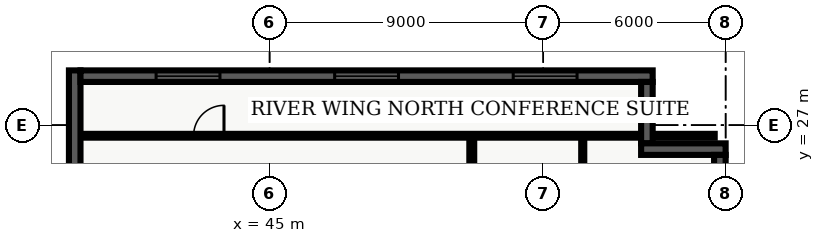
"""IFC4 building model, lengths in metres.
Left out: names, types, materials, properties, quantities, classifications, styles, units other than length and angle.
Written with IfcOpenShell. Run it as: python <this file> out.ifc"""

import sys

from ifc_helpers import new_model, entity, si_unit, converted_unit, direction, frame, origin_with_axes, origin_2d_with_axis, place, context, subcontext, project, spatial, polyline, rectangle, outline, extrude, element, fill, save


model = new_model("IFC4")
c1 = context("Model", 3, precision=1e-05, world=origin_with_axes(), true_north=direction((0.0, 1.0)))
c2 = subcontext(c1, "Body", "Model", "MODEL_VIEW")
j1 = project(units=[si_unit("LENGTHUNIT", "METRE"), converted_unit("PLANEANGLEUNIT", "DEGREE", entity("IfcPlaneAngleMeasure", 0.017), si_unit("PLANEANGLEUNIT", "RADIAN"), dimensions=[0, 0, 0, 0, 0, 0, 0])], contexts=[c1])
p1 = place(None, origin_with_axes())
s1 = spatial("IfcSite", under=j1, at=p1, CompositionType="ELEMENT")
p2 = place(p1, origin_with_axes())
s2 = spatial("IfcBuilding", under=s1, at=p2, CompositionType="ELEMENT")
p3 = place(p2, frame((0.0, 0.0, 75.6), z_axis=(0.0, 0.0, 1.0), x_axis=(1.0, 0.0, 0.0)))
s3 = spatial("IfcBuildingStorey", under=s2, at=p3, CompositionType="ELEMENT", Elevation=75.6)
p4 = place(p3, frame((51.65, 7.85, 0.0), z_axis=(0.0, 0.0, 1.0), x_axis=(0.0, 1.0, 0.0)))
e1 = element("IfcWall", 1, at=p4, inside=s3, PredefinedType="PARTITIONING", context=c2, shape_type="SweptSolid", body=[
    extrude(outline(polyline([(0.0, -0.08), (18.8, -0.08), (18.8, 0.08), (0.0, 0.08), (0.0, -0.08)])), origin_with_axes(), (0.0, 0.0, 1.0), 2.64),
])
p5 = place(p4, frame((4.443, 0.0, 0.0), z_axis=(0.0, 0.0, 1.0), x_axis=(1.0, 0.0, 0.0)))
e2 = element("IfcOpeningElement", 2, at=p5, cuts=e1, PredefinedType="OPENING", context=c2, shape_type="SweptSolid", body=[
    extrude(rectangle(XDim=1.0, YDim=0.18, at=origin_2d_with_axis()), origin_with_axes(), (0.0, 0.0, 1.0), 2.15),
])
p6 = place(p4, frame((13.503, 0.0, 0.0), z_axis=(0.0, 0.0, 1.0), x_axis=(1.0, 0.0, 0.0)))
e3 = element("IfcOpeningElement", 3, at=p6, cuts=e1, PredefinedType="OPENING", context=c2, shape_type="SweptSolid", body=[
    extrude(rectangle(XDim=1.0, YDim=0.18, at=origin_2d_with_axis()), origin_with_axes(), (0.0, 0.0, 1.0), 2.15),
])
p7 = place(p3, frame((38.76, 26.65, 0.0), z_axis=(0.0, 0.0, 1.0), x_axis=(1.0, 0.0, 0.0)))
e4 = element("IfcWall", 4, at=p7, inside=s3, PredefinedType="PARTITIONING", context=c2, shape_type="SweptSolid", body=[
    extrude(outline(polyline([(0.0, -0.062), (20.88, -0.062), (20.88, 0.062), (0.0, 0.062), (0.0, -0.062)])), origin_with_axes(), (0.0, 0.0, 1.0), 2.64),
])
p8 = place(p7, frame((4.24, 0.0, 0.0), z_axis=(0.0, 0.0, 1.0), x_axis=(1.0, 0.0, 0.0)))
e5 = element("IfcOpeningElement", 5, at=p8, cuts=e4, PredefinedType="OPENING", context=c2, shape_type="SweptSolid", body=[
    extrude(rectangle(XDim=1.0, YDim=0.145, at=origin_2d_with_axis()), origin_with_axes(), (0.0, 0.0, 1.0), 2.15),
])
p9 = place(p3, frame((55.3, 7.98, 0.0), z_axis=(0.0, 0.0, 1.0), x_axis=(0.0, 1.0, 0.0)))
e6 = element("IfcWall", 6, at=p9, inside=s3, PredefinedType="PARTITIONING", context=c2, shape_type="SweptSolid", body=[
    extrude(outline(polyline([(0.0, -0.05), (18.54, -0.05), (18.54, 0.05), (0.0, 0.05), (0.0, -0.05)])), origin_with_axes(), (0.0, 0.0, 1.0), 2.64),
])
p10 = place(p9, frame((4.033, 0.0, 0.0), z_axis=(0.0, 0.0, 1.0), x_axis=(1.0, 0.0, 0.0)))
e7 = element("IfcOpeningElement", 7, at=p10, cuts=e6, PredefinedType="OPENING", context=c2, shape_type="SweptSolid", body=[
    extrude(rectangle(XDim=0.95, YDim=0.12, at=origin_2d_with_axis()), origin_with_axes(), (0.0, 0.0, 1.0), 2.15),
])
p11 = place(p9, frame((13.373, 0.0, 0.0), z_axis=(0.0, 0.0, 1.0), x_axis=(1.0, 0.0, 0.0)))
e8 = element("IfcOpeningElement", 8, at=p11, cuts=e6, PredefinedType="OPENING", context=c2, shape_type="SweptSolid", body=[
    extrude(rectangle(XDim=0.95, YDim=0.12, at=origin_2d_with_axis()), origin_with_axes(), (0.0, 0.0, 1.0), 2.15),
])
p12 = place(p3, frame((38.59, 21.22, 0.0), z_axis=(0.0, 0.0, 1.0), x_axis=(0.0, 1.0, 0.0)))
e9 = element("IfcWall", 9, at=p12, inside=s3, PredefinedType="SOLIDWALL", context=c2, shape_type="SweptSolid", body=[
    extrude(outline(polyline([(0.0, -0.19), (7.58, -0.19), (7.58, 0.19), (0.0, 0.19), (0.0, -0.19)])), origin_with_axes(), (0.0, 0.0, 1.0), 3.6),
])
p13 = place(p3, frame((38.78, 28.61, 0.0), z_axis=(0.0, 0.0, 1.0), x_axis=(1.0, 0.0, 0.0)))
e10 = element("IfcWall", 10, at=p13, inside=s3, PredefinedType="SOLIDWALL", context=c2, shape_type="SweptSolid", body=[
    extrude(outline(polyline([(0.0, -0.19), (18.82, -0.19), (18.82, 0.19), (0.0, 0.19), (0.0, -0.19)])), origin_with_axes(), (0.0, 0.0, 1.0), 3.6),
])
p14 = place(p13, frame((3.537, 0.0, 0.45), z_axis=(0.0, 0.0, 1.0), x_axis=(1.0, 0.0, 0.0)))
e11 = element("IfcOpeningElement", 11, at=p14, cuts=e10, PredefinedType="OPENING", context=c2, shape_type="SweptSolid", body=[
    extrude(rectangle(XDim=2.1, YDim=0.4, at=origin_2d_with_axis()), origin_with_axes(), (0.0, 0.0, 1.0), 2.2),
])
p15 = place(p13, frame((9.41, 0.0, 0.45), z_axis=(0.0, 0.0, 1.0), x_axis=(1.0, 0.0, 0.0)))
e12 = element("IfcOpeningElement", 12, at=p15, cuts=e10, PredefinedType="OPENING", context=c2, shape_type="SweptSolid", body=[
    extrude(rectangle(XDim=2.1, YDim=0.4, at=origin_2d_with_axis()), origin_with_axes(), (0.0, 0.0, 1.0), 2.2),
])
p16 = place(p13, frame((15.283, 0.0, 0.45), z_axis=(0.0, 0.0, 1.0), x_axis=(1.0, 0.0, 0.0)))
e13 = element("IfcOpeningElement", 13, at=p16, cuts=e10, PredefinedType="OPENING", context=c2, shape_type="SweptSolid", body=[
    extrude(rectangle(XDim=2.1, YDim=0.4, at=origin_2d_with_axis()), origin_with_axes(), (0.0, 0.0, 1.0), 2.2),
])
p17 = place(p3, frame((57.41, 28.42, 0.0), z_axis=(0.0, 0.0, 1.0), x_axis=(0.0, -1.0, 0.0)))
e14 = element("IfcWall", 14, at=p17, inside=s3, PredefinedType="SOLIDWALL", context=c2, shape_type="SweptSolid", body=[
    extrude(outline(polyline([(0.0, -0.19), (2.02, -0.19), (2.02, 0.19), (0.0, 0.19), (0.0, -0.19)])), origin_with_axes(), (0.0, 0.0, 1.0), 3.6),
])
p18 = place(p3, frame((57.22, 26.21, 0.0), z_axis=(0.0, 0.0, 1.0), x_axis=(1.0, 0.0, 0.0)))
e15 = element("IfcWall", 15, at=p18, inside=s3, PredefinedType="SOLIDWALL", context=c2, shape_type="SweptSolid", body=[
    extrude(outline(polyline([(0.0, -0.19), (2.78, -0.19), (2.78, 0.19), (0.0, 0.19), (0.0, -0.19)])), origin_with_axes(), (0.0, 0.0, 1.0), 3.6),
])
p19 = place(p3, frame((59.81, 26.02, 0.0), z_axis=(0.0, 0.0, 1.0), x_axis=(0.0, -1.0, 0.0)))
e16 = element("IfcWall", 16, at=p19, inside=s3, PredefinedType="SOLIDWALL", context=c2, shape_type="SweptSolid", body=[
    extrude(outline(polyline([(0.0, -0.19), (23.62, -0.19), (23.62, 0.19), (0.0, 0.19), (0.0, -0.19)])), origin_with_axes(), (0.0, 0.0, 1.0), 3.6),
])
p20 = place(p19, frame((3.853, 0.0, 0.45), z_axis=(0.0, 0.0, 1.0), x_axis=(1.0, 0.0, 0.0)))
e17 = element("IfcOpeningElement", 17, at=p20, cuts=e16, PredefinedType="OPENING", context=c2, shape_type="SweptSolid", body=[
    extrude(rectangle(XDim=2.1, YDim=0.4, at=origin_2d_with_axis()), origin_with_axes(), (0.0, 0.0, 1.0), 2.2),
])
p21 = place(p19, frame((20.218, 0.0, 0.45), z_axis=(0.0, 0.0, 1.0), x_axis=(1.0, 0.0, 0.0)))
e18 = element("IfcOpeningElement", 18, at=p21, cuts=e16, PredefinedType="OPENING", context=c2, shape_type="SweptSolid", body=[
    extrude(rectangle(XDim=2.1, YDim=0.4, at=origin_2d_with_axis()), origin_with_axes(), (0.0, 0.0, 1.0), 2.2),
])
p22 = place(p7, frame((4.24, 0.0, 0.0), z_axis=(0.0, 0.0, 1.0), x_axis=(1.0, 0.0, 0.0)))
e19 = element("IfcDoor", 19, at=p22, inside=s3, OperationType="SINGLE_SWING_RIGHT", PredefinedType="DOOR", context=c2, shape_type="SweptSolid", body=[
    extrude(rectangle(XDim=1.0, YDim=0.075, at=origin_2d_with_axis()), origin_with_axes(), (0.0, 0.0, 1.0), 2.15),
])
fill(e5, e19)
p23 = place(p13, frame((3.537, 0.0, 0.45), z_axis=(0.0, 0.0, 1.0), x_axis=(1.0, 0.0, 0.0)))
e20 = element("IfcWindow", 20, at=p23, inside=s3, PredefinedType="WINDOW", context=c2, shape_type="SweptSolid", body=[
    extrude(rectangle(XDim=2.1, YDim=0.09, at=origin_2d_with_axis()), origin_with_axes(), (0.0, 0.0, 1.0), 2.2),
])
fill(e11, e20)
p24 = place(p13, frame((9.41, 0.0, 0.45), z_axis=(0.0, 0.0, 1.0), x_axis=(1.0, 0.0, 0.0)))
e21 = element("IfcWindow", 21, at=p24, inside=s3, PredefinedType="WINDOW", context=c2, shape_type="SweptSolid", body=[
    extrude(rectangle(XDim=2.1, YDim=0.09, at=origin_2d_with_axis()), origin_with_axes(), (0.0, 0.0, 1.0), 2.2),
])
fill(e12, e21)
p25 = place(p13, frame((15.283, 0.0, 0.45), z_axis=(0.0, 0.0, 1.0), x_axis=(1.0, 0.0, 0.0)))
e22 = element("IfcWindow", 22, at=p25, inside=s3, PredefinedType="WINDOW", context=c2, shape_type="SweptSolid", body=[
    extrude(rectangle(XDim=2.1, YDim=0.09, at=origin_2d_with_axis()), origin_with_axes(), (0.0, 0.0, 1.0), 2.2),
])
fill(e13, e22)
save(model, sys.argv[1])
